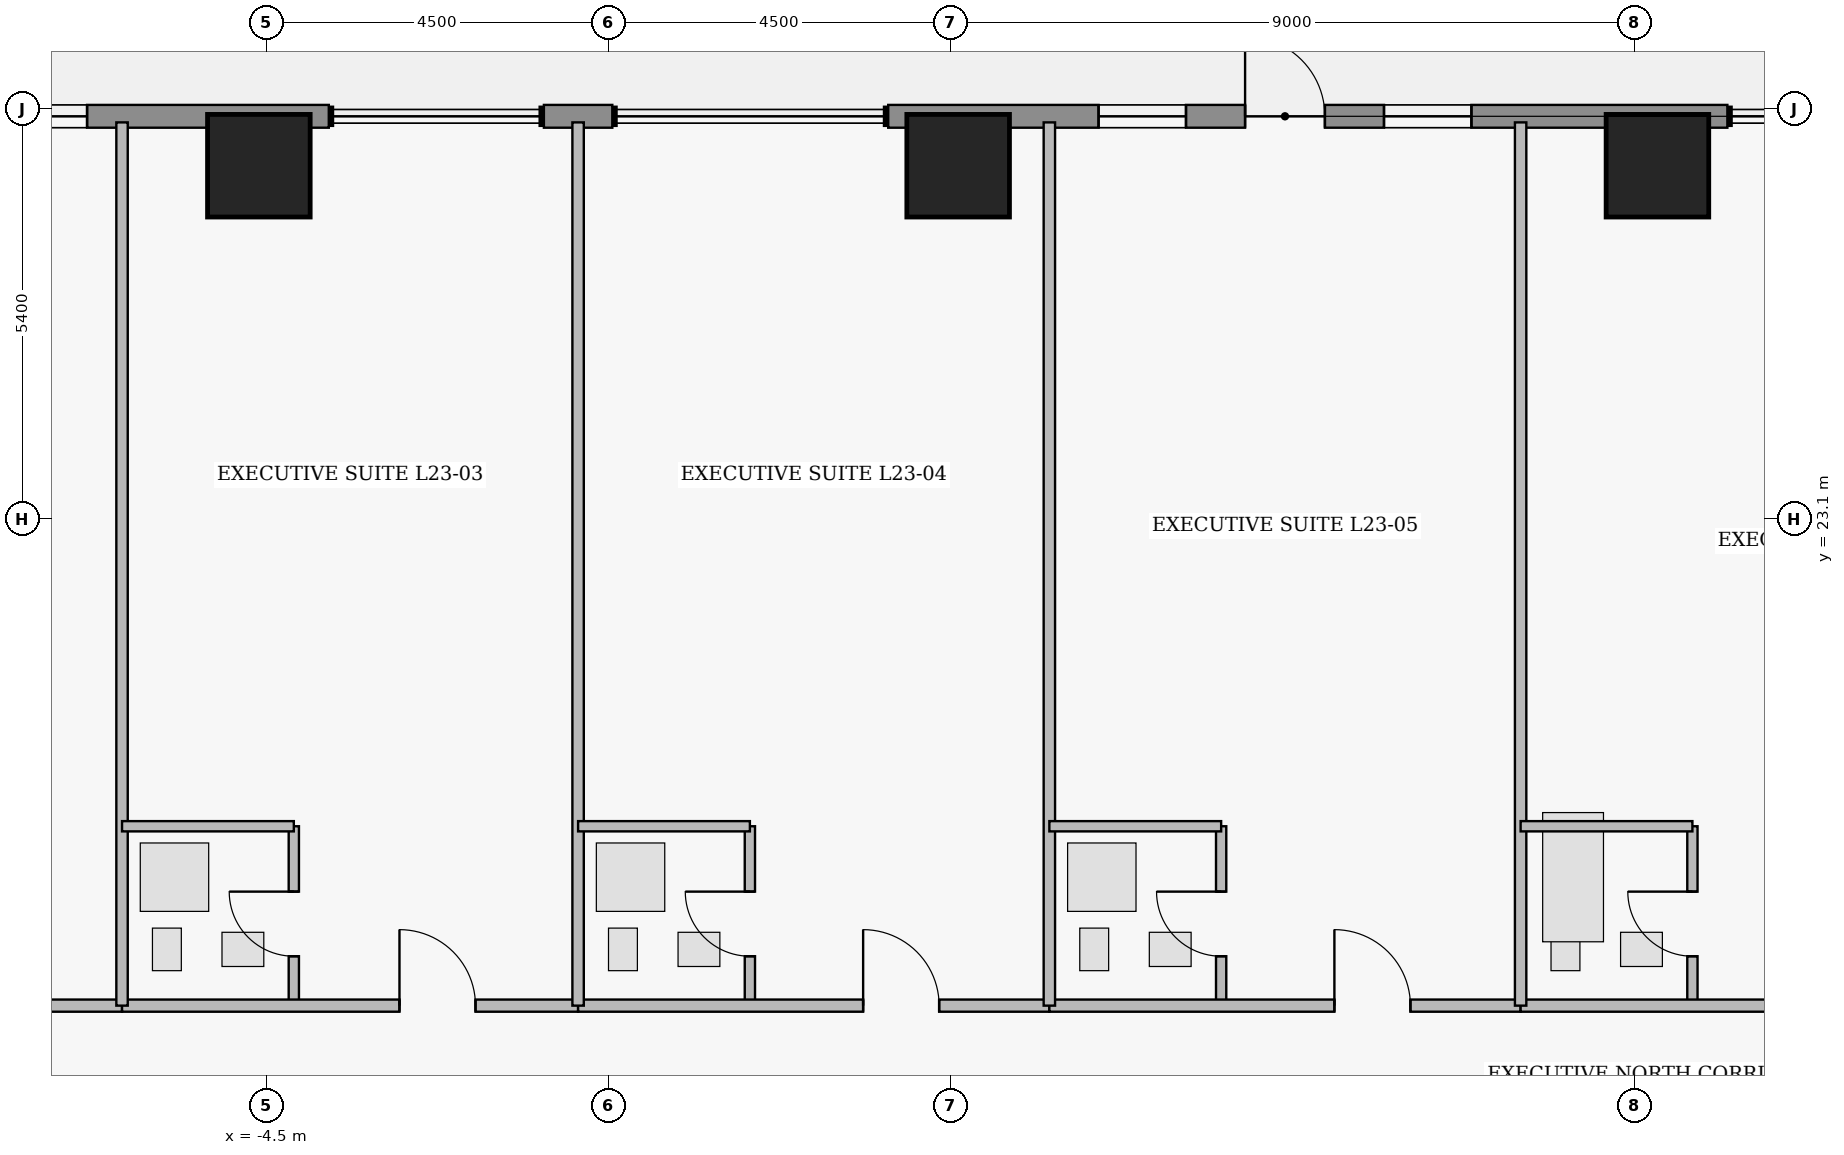
"""IFC4 building model, lengths in metres.
Left out: names, types, materials, properties, quantities, classifications, styles, units other than length and angle.
Written with IfcOpenShell. Run it as: python <this file> out.ifc"""

import sys

from ifc_helpers import new_model, si_unit, direction, frame, frame_2d, origin, origin_2d, place, context, subcontext, project, spatial, rectangle, extrude, element, fill, save


model = new_model("IFC4")
c1 = context("Model", 3, precision=1e-05, world=origin(), true_north=direction((0.0, 1.0)))
c2 = subcontext(c1, "Body", "Model", "MODEL_VIEW")
j1 = project(units=[si_unit("LENGTHUNIT", "METRE"), si_unit("PLANEANGLEUNIT", "RADIAN")], contexts=[c1])
p1 = place(None, origin())
s1 = spatial("IfcSite", under=j1, at=p1, CompositionType="ELEMENT")
p2 = place(p1, origin())
s2 = spatial("IfcBuilding", under=s1, at=p2, CompositionType="ELEMENT")
p3 = place(p2, frame((0.0, 0.0, 95.65)))
s3 = spatial("IfcBuildingStorey", under=s2, at=p3, CompositionType="ELEMENT", Elevation=95.65)
for number, where, z_axis, x_axis in (
    (1, (-4.6, 27.75, 0.43), (0.0, 0.0, 1.0), (1.0, 0.0, 0.0)),
    (2, (4.6, 27.75, 0.43), (0.0, 0.0, 1.0), (1.0, 0.0, 0.0)),
    (3, (13.8, 27.75, 0.43), (0.0, 0.0, 1.0), (1.0, 0.0, 0.0)),
):
    element("IfcColumn", number, at=place(p3, frame(where, z_axis=z_axis, x_axis=x_axis)), inside=s3, PredefinedType="COLUMN", context=c2, shape_type="SweptSolid", body=[
        extrude(rectangle(XDim=1.35, YDim=1.35, at=origin_2d()), origin(), (0.0, 0.0, 1.0), 3.22),
    ])
p4 = place(p3, frame((-14.72, 28.4, 0.0), z_axis=(0.0, 0.0, 1.0), x_axis=(1.0, 0.0, 0.0)))
e4 = element("IfcWall", 4, at=p4, inside=s3, PredefinedType="STANDARD", context=c2, shape_type="SweptSolid", body=[
    extrude(rectangle(XDim=11.04, YDim=0.3, at=frame_2d((5.52, 0.0))), origin(), (0.0, 0.0, 1.0), 3.43),
])
p5 = place(p4, frame((4.52, 0.0, 0.85)))
e5 = element("IfcOpeningElement", 5, at=p5, cuts=e4, PredefinedType="OPENING", context=c2, shape_type="SweptSolid", body=[
    extrude(rectangle(XDim=1.6, YDim=1.8, at=frame_2d((0.8, 0.9))), frame((0.0, 0.16, 0.0), z_axis=(0.0, -1.0, 0.0), x_axis=(1.0, 0.0, 0.0)), (0.0, 0.0, 1.0), 0.32),
])
p6 = place(p4, frame((2.78, 0.0, 0.95)))
e6 = element("IfcOpeningElement", 6, at=p6, cuts=e4, PredefinedType="OPENING", context=c2, shape_type="SweptSolid", body=[
    extrude(rectangle(XDim=1.15, YDim=1.55, at=frame_2d((0.575, 0.775))), frame((0.0, 0.16, 0.0), z_axis=(0.0, -1.0, 0.0), x_axis=(1.0, 0.0, 0.0)), (0.0, 0.0, 1.0), 0.32),
])
p7 = place(p4, frame((6.71, 0.0, 0.95)))
e7 = element("IfcOpeningElement", 7, at=p7, cuts=e4, PredefinedType="OPENING", context=c2, shape_type="SweptSolid", body=[
    extrude(rectangle(XDim=1.15, YDim=1.55, at=frame_2d((0.575, 0.775))), frame((0.0, 0.16, 0.0), z_axis=(0.0, -1.0, 0.0), x_axis=(1.0, 0.0, 0.0)), (0.0, 0.0, 1.0), 0.32),
])
p8 = place(p3, frame((-0.85, 28.4, 0.0), z_axis=(0.0, 0.0, 1.0), x_axis=(1.0, 0.0, 0.0)))
e8 = element("IfcWall", 8, at=p8, inside=s3, PredefinedType="STANDARD", context=c2, shape_type="SweptSolid", body=[
    extrude(rectangle(XDim=0.9, YDim=0.3, at=frame_2d((0.45, 0.0))), origin(), (0.0, 0.0, 1.0), 3.43),
])
p9 = place(p3, frame((3.68, 28.4, 0.0), z_axis=(0.0, 0.0, 1.0), x_axis=(1.0, 0.0, 0.0)))
e9 = element("IfcWall", 9, at=p9, inside=s3, PredefinedType="STANDARD", context=c2, shape_type="SweptSolid", body=[
    extrude(rectangle(XDim=11.04, YDim=0.3, at=frame_2d((5.52, 0.0))), origin(), (0.0, 0.0, 1.0), 3.43),
])
p10 = place(p9, frame((4.695, 0.0, 0.0)))
e10 = element("IfcOpeningElement", 10, at=p10, cuts=e9, PredefinedType="OPENING", context=c2, shape_type="SweptSolid", body=[
    extrude(rectangle(XDim=1.05, YDim=2.2, at=frame_2d((0.525, 1.1))), frame((0.0, 0.16, 0.0), z_axis=(0.0, -1.0, 0.0), x_axis=(1.0, 0.0, 0.0)), (0.0, 0.0, 1.0), 0.32),
])
p11 = place(p9, frame((2.768, 0.0, 0.95)))
e11 = element("IfcOpeningElement", 11, at=p11, cuts=e9, PredefinedType="OPENING", context=c2, shape_type="SweptSolid", body=[
    extrude(rectangle(XDim=1.15, YDim=1.55, at=frame_2d((0.575, 0.775))), frame((0.0, 0.16, 0.0), z_axis=(0.0, -1.0, 0.0), x_axis=(1.0, 0.0, 0.0)), (0.0, 0.0, 1.0), 0.32),
])
p12 = place(p9, frame((6.522, 0.0, 0.95)))
e12 = element("IfcOpeningElement", 12, at=p12, cuts=e9, PredefinedType="OPENING", context=c2, shape_type="SweptSolid", body=[
    extrude(rectangle(XDim=1.15, YDim=1.55, at=frame_2d((0.575, 0.775))), frame((0.0, 0.16, 0.0), z_axis=(0.0, -1.0, 0.0), x_axis=(1.0, 0.0, 0.0)), (0.0, 0.0, 1.0), 0.32),
])
p13 = place(p3, frame((-12.4, 16.7, 0.0), z_axis=(0.0, 0.0, 1.0), x_axis=(1.0, 0.0, 0.0)))
e13 = element("IfcWall", 13, at=p13, inside=s3, PredefinedType="PARTITIONING", context=c2, shape_type="SweptSolid", body=[
    extrude(rectangle(XDim=6.0, YDim=0.16, at=frame_2d((3.0, 0.0))), origin(), (0.0, 0.0, 1.0), 2.973),
])
p14 = place(p13, frame((3.65, 0.0, 0.0)))
e14 = element("IfcOpeningElement", 14, at=p14, cuts=e13, PredefinedType="OPENING", context=c2, shape_type="SweptSolid", body=[
    extrude(rectangle(XDim=1.0, YDim=2.15, at=frame_2d((0.5, 1.075))), frame((0.0, 0.09, 0.0), z_axis=(0.0, -1.0, 0.0), x_axis=(1.0, 0.0, 0.0)), (0.0, 0.0, 1.0), 0.18),
])
p15 = place(p3, frame((-4.14, 16.7, 0.0), z_axis=(0.0, 0.0, 1.0), x_axis=(0.0, 1.0, 0.0)))
e15 = element("IfcWall", 15, at=p15, inside=s3, PredefinedType="PLUMBINGWALL", context=c2, shape_type="SweptSolid", body=[
    extrude(rectangle(XDim=2.36, YDim=0.135, at=frame_2d((1.18, 0.0))), origin(), (0.0, 0.0, 1.0), 2.503),
])
p16 = place(p15, frame((0.65, 0.0, 0.0)))
e16 = element("IfcOpeningElement", 16, at=p16, cuts=e15, PredefinedType="OPENING", context=c2, shape_type="SweptSolid", body=[
    extrude(rectangle(XDim=0.85, YDim=2.1, at=frame_2d((0.425, 1.05))), frame((0.0, 0.077, 0.0), z_axis=(0.0, -1.0, 0.0), x_axis=(1.0, 0.0, 0.0)), (0.0, 0.0, 1.0), 0.155),
])
p17 = place(p3, frame((-6.4, 16.7, 0.0), z_axis=(0.0, 0.0, 1.0), x_axis=(1.0, 0.0, 0.0)))
e17 = element("IfcWall", 17, at=p17, inside=s3, PredefinedType="PARTITIONING", context=c2, shape_type="SweptSolid", body=[
    extrude(rectangle(XDim=6.0, YDim=0.16, at=frame_2d((3.0, 0.0))), origin(), (0.0, 0.0, 1.0), 2.973),
])
p18 = place(p17, frame((3.65, 0.0, 0.0)))
e18 = element("IfcOpeningElement", 18, at=p18, cuts=e17, PredefinedType="OPENING", context=c2, shape_type="SweptSolid", body=[
    extrude(rectangle(XDim=1.0, YDim=2.15, at=frame_2d((0.5, 1.075))), frame((0.0, 0.09, 0.0), z_axis=(0.0, -1.0, 0.0), x_axis=(1.0, 0.0, 0.0)), (0.0, 0.0, 1.0), 0.18),
])
p19 = place(p3, frame((1.86, 16.7, 0.0), z_axis=(0.0, 0.0, 1.0), x_axis=(0.0, 1.0, 0.0)))
e19 = element("IfcWall", 19, at=p19, inside=s3, PredefinedType="PLUMBINGWALL", context=c2, shape_type="SweptSolid", body=[
    extrude(rectangle(XDim=2.36, YDim=0.135, at=frame_2d((1.18, 0.0))), origin(), (0.0, 0.0, 1.0), 3.43),
])
p20 = place(p19, frame((0.65, 0.0, 0.0)))
e20 = element("IfcOpeningElement", 20, at=p20, cuts=e19, PredefinedType="OPENING", context=c2, shape_type="SweptSolid", body=[
    extrude(rectangle(XDim=0.85, YDim=2.1, at=frame_2d((0.425, 1.05))), frame((0.0, 0.077, 0.0), z_axis=(0.0, -1.0, 0.0), x_axis=(1.0, 0.0, 0.0)), (0.0, 0.0, 1.0), 0.155),
])
p21 = place(p3, frame((-0.4, 16.7, 0.0), z_axis=(0.0, 0.0, 1.0), x_axis=(1.0, 0.0, 0.0)))
e21 = element("IfcWall", 21, at=p21, inside=s3, PredefinedType="PARTITIONING", context=c2, shape_type="SweptSolid", body=[
    extrude(rectangle(XDim=6.2, YDim=0.16, at=frame_2d((3.1, 0.0))), origin(), (0.0, 0.0, 1.0), 2.973),
])
p22 = place(p21, frame((3.75, 0.0, 0.0)))
e22 = element("IfcOpeningElement", 22, at=p22, cuts=e21, PredefinedType="OPENING", context=c2, shape_type="SweptSolid", body=[
    extrude(rectangle(XDim=1.0, YDim=2.15, at=frame_2d((0.5, 1.075))), frame((0.0, 0.09, 0.0), z_axis=(0.0, -1.0, 0.0), x_axis=(1.0, 0.0, 0.0)), (0.0, 0.0, 1.0), 0.18),
])
p23 = place(p3, frame((8.06, 16.7, 0.0), z_axis=(0.0, 0.0, 1.0), x_axis=(0.0, 1.0, 0.0)))
e23 = element("IfcWall", 23, at=p23, inside=s3, PredefinedType="PLUMBINGWALL", context=c2, shape_type="SweptSolid", body=[
    extrude(rectangle(XDim=2.36, YDim=0.135, at=frame_2d((1.18, 0.0))), origin(), (0.0, 0.0, 1.0), 3.43),
])
p24 = place(p23, frame((0.65, 0.0, 0.0)))
e24 = element("IfcOpeningElement", 24, at=p24, cuts=e23, PredefinedType="OPENING", context=c2, shape_type="SweptSolid", body=[
    extrude(rectangle(XDim=0.85, YDim=2.1, at=frame_2d((0.425, 1.05))), frame((0.0, 0.077, 0.0), z_axis=(0.0, -1.0, 0.0), x_axis=(1.0, 0.0, 0.0)), (0.0, 0.0, 1.0), 0.155),
])
p25 = place(p3, frame((5.8, 16.7, 0.0), z_axis=(0.0, 0.0, 1.0), x_axis=(1.0, 0.0, 0.0)))
e25 = element("IfcWall", 25, at=p25, inside=s3, PredefinedType="PARTITIONING", context=c2, shape_type="SweptSolid", body=[
    extrude(rectangle(XDim=6.2, YDim=0.16, at=frame_2d((3.1, 0.0))), origin(), (0.0, 0.0, 1.0), 2.973),
])
p26 = place(p25, frame((3.75, 0.0, 0.0)))
e26 = element("IfcOpeningElement", 26, at=p26, cuts=e25, PredefinedType="OPENING", context=c2, shape_type="SweptSolid", body=[
    extrude(rectangle(XDim=1.0, YDim=2.15, at=frame_2d((0.5, 1.075))), frame((0.0, 0.09, 0.0), z_axis=(0.0, -1.0, 0.0), x_axis=(1.0, 0.0, 0.0)), (0.0, 0.0, 1.0), 0.18),
])
p27 = place(p3, frame((14.26, 16.7, 0.0), z_axis=(0.0, 0.0, 1.0), x_axis=(0.0, 1.0, 0.0)))
e27 = element("IfcWall", 27, at=p27, inside=s3, PredefinedType="PLUMBINGWALL", context=c2, shape_type="SweptSolid", body=[
    extrude(rectangle(XDim=2.36, YDim=0.135, at=frame_2d((1.18, 0.0))), origin(), (0.0, 0.0, 1.0), 2.503),
])
p28 = place(p27, frame((0.65, 0.0, 0.0)))
e28 = element("IfcOpeningElement", 28, at=p28, cuts=e27, PredefinedType="OPENING", context=c2, shape_type="SweptSolid", body=[
    extrude(rectangle(XDim=0.85, YDim=2.1, at=frame_2d((0.425, 1.05))), frame((0.0, 0.077, 0.0), z_axis=(0.0, -1.0, 0.0), x_axis=(1.0, 0.0, 0.0)), (0.0, 0.0, 1.0), 0.155),
])
p29 = place(p3, frame((12.0, 16.7, 0.0), z_axis=(0.0, 0.0, 1.0), x_axis=(1.0, 0.0, 0.0)))
e29 = element("IfcWall", 29, at=p29, inside=s3, PredefinedType="PARTITIONING", context=c2, shape_type="SweptSolid", body=[
    extrude(rectangle(XDim=8.6, YDim=0.16, at=frame_2d((4.3, 0.0))), origin(), (0.0, 0.0, 1.0), 2.973),
])
p30 = place(p29, frame((4.825, 0.0, 0.0)))
e30 = element("IfcOpeningElement", 30, at=p30, cuts=e29, PredefinedType="OPENING", context=c2, shape_type="SweptSolid", body=[
    extrude(rectangle(XDim=1.0, YDim=2.15, at=frame_2d((0.5, 1.075))), frame((0.0, 0.09, 0.0), z_axis=(0.0, -1.0, 0.0), x_axis=(1.0, 0.0, 0.0)), (0.0, 0.0, 1.0), 0.18),
])
p31 = place(p3, frame((-6.4, 16.7, 0.0), z_axis=(0.0, 0.0, 1.0), x_axis=(0.0, 1.0, 0.0)))
e31 = element("IfcWall", 31, at=p31, inside=s3, PredefinedType="PARTITIONING", context=c2, shape_type="SweptSolid", body=[
    extrude(rectangle(XDim=11.62, YDim=0.15, at=frame_2d((5.81, 0.0))), origin(), (0.0, 0.0, 1.0), 3.43),
])
p32 = place(p3, frame((-6.4, 19.06, 0.0), z_axis=(0.0, 0.0, 1.0), x_axis=(1.0, 0.0, 0.0)))
e32 = element("IfcWall", 32, at=p32, inside=s3, PredefinedType="PLUMBINGWALL", context=c2, shape_type="SweptSolid", body=[
    extrude(rectangle(XDim=2.26, YDim=0.135, at=frame_2d((1.13, 0.0))), origin(), (0.0, 0.0, 1.0), 2.973),
])
p33 = place(p3, frame((-0.4, 16.7, 0.0), z_axis=(0.0, 0.0, 1.0), x_axis=(0.0, 1.0, 0.0)))
e33 = element("IfcWall", 33, at=p33, inside=s3, PredefinedType="PARTITIONING", context=c2, shape_type="SweptSolid", body=[
    extrude(rectangle(XDim=11.62, YDim=0.15, at=frame_2d((5.81, 0.0))), origin(), (0.0, 0.0, 1.0), 3.43),
])
p34 = place(p3, frame((-0.4, 19.06, 0.0), z_axis=(0.0, 0.0, 1.0), x_axis=(1.0, 0.0, 0.0)))
e34 = element("IfcWall", 34, at=p34, inside=s3, PredefinedType="PLUMBINGWALL", context=c2, shape_type="SweptSolid", body=[
    extrude(rectangle(XDim=2.26, YDim=0.135, at=frame_2d((1.13, 0.0))), origin(), (0.0, 0.0, 1.0), 2.973),
])
p35 = place(p3, frame((5.8, 16.7, 0.0), z_axis=(0.0, 0.0, 1.0), x_axis=(0.0, 1.0, 0.0)))
e35 = element("IfcWall", 35, at=p35, inside=s3, PredefinedType="PARTITIONING", context=c2, shape_type="SweptSolid", body=[
    extrude(rectangle(XDim=11.62, YDim=0.15, at=frame_2d((5.81, 0.0))), origin(), (0.0, 0.0, 1.0), 3.43),
])
p36 = place(p3, frame((5.8, 19.06, 0.0), z_axis=(0.0, 0.0, 1.0), x_axis=(1.0, 0.0, 0.0)))
e36 = element("IfcWall", 36, at=p36, inside=s3, PredefinedType="PLUMBINGWALL", context=c2, shape_type="SweptSolid", body=[
    extrude(rectangle(XDim=2.26, YDim=0.135, at=frame_2d((1.13, 0.0))), origin(), (0.0, 0.0, 1.0), 2.973),
])
p37 = place(p3, frame((12.0, 16.7, 0.0), z_axis=(0.0, 0.0, 1.0), x_axis=(0.0, 1.0, 0.0)))
e37 = element("IfcWall", 37, at=p37, inside=s3, PredefinedType="PARTITIONING", context=c2, shape_type="SweptSolid", body=[
    extrude(rectangle(XDim=11.62, YDim=0.15, at=frame_2d((5.81, 0.0))), origin(), (0.0, 0.0, 1.0), 3.43),
])
p38 = place(p3, frame((12.0, 19.06, 0.0), z_axis=(0.0, 0.0, 1.0), x_axis=(1.0, 0.0, 0.0)))
e38 = element("IfcWall", 38, at=p38, inside=s3, PredefinedType="PLUMBINGWALL", context=c2, shape_type="SweptSolid", body=[
    extrude(rectangle(XDim=2.26, YDim=0.135, at=frame_2d((1.13, 0.0))), origin(), (0.0, 0.0, 1.0), 2.973),
])
p39 = place(p7, origin())
e39 = element("IfcWindow", 39, at=p39, inside=s3, PartitioningType="SINGLE_PANEL", PredefinedType="WINDOW", context=c2, shape_type="SweptSolid", body=[
    extrude(rectangle(XDim=1.15, YDim=1.55, at=frame_2d((0.575, 0.775))), frame((0.0, 0.03, 0.0), z_axis=(0.0, -1.0, 0.0), x_axis=(1.0, 0.0, 0.0)), (0.0, 0.0, 1.0), 0.06),
])
fill(e7, e39)
p40 = place(p10, origin())
e40 = element("IfcDoor", 40, at=p40, inside=s3, OperationType="SINGLE_SWING_LEFT", PredefinedType="DOOR", context=c2, shape_type="SweptSolid", body=[
    extrude(rectangle(XDim=1.05, YDim=2.2, at=frame_2d((0.525, 1.1))), frame((0.0, 0.025, 0.0), z_axis=(0.0, -1.0, 0.0), x_axis=(1.0, 0.0, 0.0)), (0.0, 0.0, 1.0), 0.05),
])
fill(e10, e40)
p41 = place(p11, origin())
e41 = element("IfcWindow", 41, at=p41, inside=s3, PartitioningType="SINGLE_PANEL", PredefinedType="WINDOW", context=c2, shape_type="SweptSolid", body=[
    extrude(rectangle(XDim=1.15, YDim=1.55, at=frame_2d((0.575, 0.775))), frame((0.0, 0.03, 0.0), z_axis=(0.0, -1.0, 0.0), x_axis=(1.0, 0.0, 0.0)), (0.0, 0.0, 1.0), 0.06),
])
fill(e11, e41)
p42 = place(p12, origin())
e42 = element("IfcWindow", 42, at=p42, inside=s3, PartitioningType="SINGLE_PANEL", PredefinedType="WINDOW", context=c2, shape_type="SweptSolid", body=[
    extrude(rectangle(XDim=1.15, YDim=1.55, at=frame_2d((0.575, 0.775))), frame((0.0, 0.03, 0.0), z_axis=(0.0, -1.0, 0.0), x_axis=(1.0, 0.0, 0.0)), (0.0, 0.0, 1.0), 0.06),
])
fill(e12, e42)
p43 = place(p16, origin())
e43 = element("IfcDoor", 43, at=p43, inside=s3, OperationType="SINGLE_SWING_RIGHT", PredefinedType="DOOR", context=c2, shape_type="SweptSolid", body=[
    extrude(rectangle(XDim=0.85, YDim=2.1, at=frame_2d((0.425, 1.05))), frame((0.0, 0.025, 0.0), z_axis=(0.0, -1.0, 0.0), x_axis=(1.0, 0.0, 0.0)), (0.0, 0.0, 1.0), 0.05),
])
fill(e16, e43)
p44 = place(p18, origin())
e44 = element("IfcDoor", 44, at=p44, inside=s3, OperationType="SINGLE_SWING_LEFT", PredefinedType="DOOR", context=c2, shape_type="SweptSolid", body=[
    extrude(rectangle(XDim=1.0, YDim=2.15, at=frame_2d((0.5, 1.075))), frame((0.0, 0.025, 0.0), z_axis=(0.0, -1.0, 0.0), x_axis=(1.0, 0.0, 0.0)), (0.0, 0.0, 1.0), 0.05),
])
fill(e18, e44)
p45 = place(p20, origin())
e45 = element("IfcDoor", 45, at=p45, inside=s3, OperationType="SINGLE_SWING_RIGHT", PredefinedType="DOOR", context=c2, shape_type="SweptSolid", body=[
    extrude(rectangle(XDim=0.85, YDim=2.1, at=frame_2d((0.425, 1.05))), frame((0.0, 0.025, 0.0), z_axis=(0.0, -1.0, 0.0), x_axis=(1.0, 0.0, 0.0)), (0.0, 0.0, 1.0), 0.05),
])
fill(e20, e45)
p46 = place(p22, origin())
e46 = element("IfcDoor", 46, at=p46, inside=s3, OperationType="SINGLE_SWING_LEFT", PredefinedType="DOOR", context=c2, shape_type="SweptSolid", body=[
    extrude(rectangle(XDim=1.0, YDim=2.15, at=frame_2d((0.5, 1.075))), frame((0.0, 0.025, 0.0), z_axis=(0.0, -1.0, 0.0), x_axis=(1.0, 0.0, 0.0)), (0.0, 0.0, 1.0), 0.05),
])
fill(e22, e46)
p47 = place(p24, origin())
e47 = element("IfcDoor", 47, at=p47, inside=s3, OperationType="SINGLE_SWING_RIGHT", PredefinedType="DOOR", context=c2, shape_type="SweptSolid", body=[
    extrude(rectangle(XDim=0.85, YDim=2.1, at=frame_2d((0.425, 1.05))), frame((0.0, 0.025, 0.0), z_axis=(0.0, -1.0, 0.0), x_axis=(1.0, 0.0, 0.0)), (0.0, 0.0, 1.0), 0.05),
])
fill(e24, e47)
p48 = place(p26, origin())
e48 = element("IfcDoor", 48, at=p48, inside=s3, OperationType="SINGLE_SWING_LEFT", PredefinedType="DOOR", context=c2, shape_type="SweptSolid", body=[
    extrude(rectangle(XDim=1.0, YDim=2.15, at=frame_2d((0.5, 1.075))), frame((0.0, 0.025, 0.0), z_axis=(0.0, -1.0, 0.0), x_axis=(1.0, 0.0, 0.0)), (0.0, 0.0, 1.0), 0.05),
])
fill(e26, e48)
p49 = place(p28, origin())
e49 = element("IfcDoor", 49, at=p49, inside=s3, OperationType="SINGLE_SWING_RIGHT", PredefinedType="DOOR", context=c2, shape_type="SweptSolid", body=[
    extrude(rectangle(XDim=0.85, YDim=2.1, at=frame_2d((0.425, 1.05))), frame((0.0, 0.025, 0.0), z_axis=(0.0, -1.0, 0.0), x_axis=(1.0, 0.0, 0.0)), (0.0, 0.0, 1.0), 0.05),
])
fill(e28, e49)
save(model, sys.argv[1])
